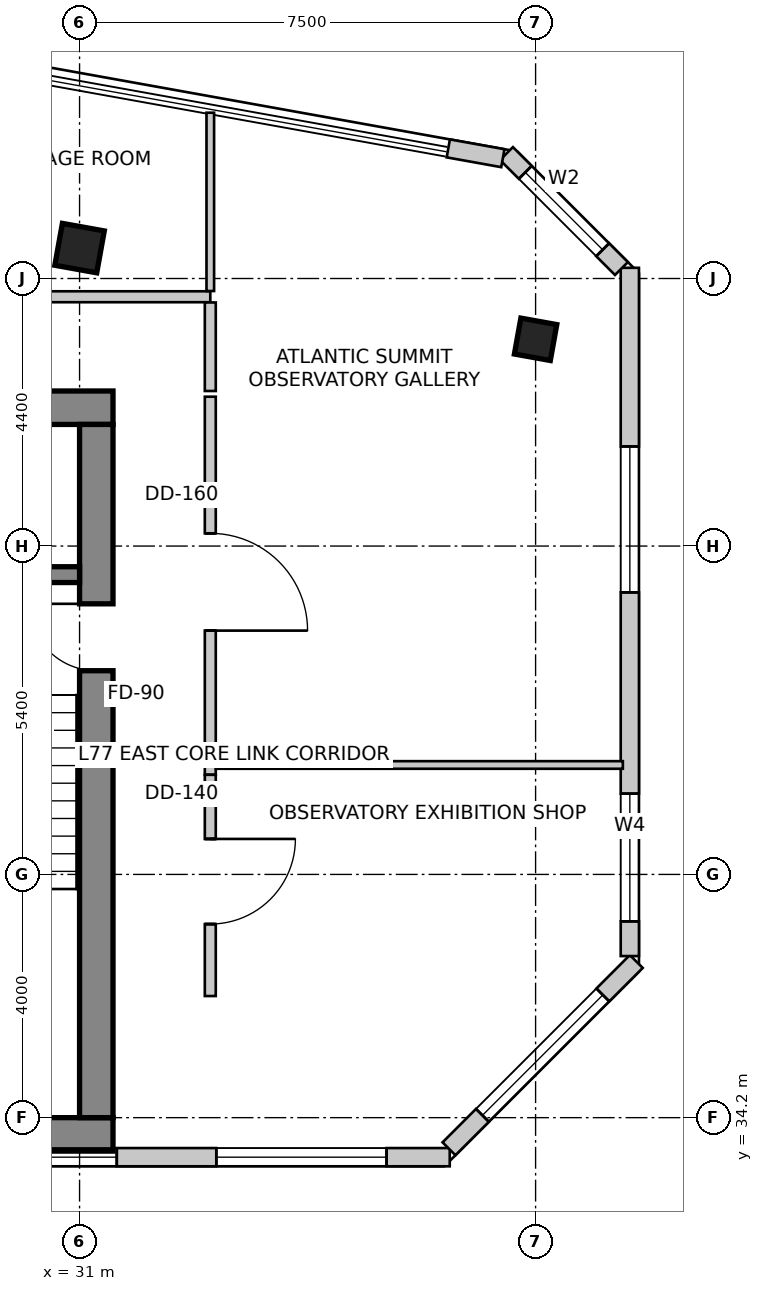
"""IFC4 building model, lengths in metres.
Left out: names, types, materials, properties, quantities, classifications, styles, units other than length and angle.
Written with IfcOpenShell. Run it as: python <this file> out.ifc"""

import sys

from ifc_helpers import new_model, si_unit, direction, frame, frame_2d, origin, origin_2d, place, context, subcontext, project, spatial, rectangle, extrude, source, transform, mapped, element, fill, save


model = new_model("IFC4")
c1 = context("Model", 3, precision=1e-05, world=origin(), true_north=direction((0.0, 1.0)))
c2 = subcontext(c1, "Body", "Model", "MODEL_VIEW")
j1 = project(units=[si_unit("LENGTHUNIT", "METRE"), si_unit("PLANEANGLEUNIT", "RADIAN")], contexts=[c1])
p1 = place(None, origin())
s1 = spatial("IfcSite", under=j1, at=p1, CompositionType="ELEMENT")
p2 = place(p1, origin())
s2 = spatial("IfcBuilding", under=s1, at=p2, CompositionType="ELEMENT")
p3 = place(p2, frame((0.0, 0.0, 300.5)))
s3 = spatial("IfcBuildingStorey", under=s2, at=p3, CompositionType="ELEMENT", Elevation=300.5)
p4 = place(p3, frame((16.05, 45.875, 0.0), z_axis=(0.0, 0.0, 1.0), x_axis=(1.0, 0.0, 0.0)))
e1 = element("IfcWall", 1, at=p4, inside=s3, PredefinedType="SHEAR", context=c2, shape_type="SweptSolid", body=[
    extrude(rectangle(XDim=15.5, YDim=0.55, at=frame_2d((7.75, 0.0))), origin(), (0.0, 0.0, 1.0), 4.0),
])
p5 = place(p3, frame((16.05, 33.925, 0.0), z_axis=(0.0, 0.0, 1.0), x_axis=(1.0, 0.0, 0.0)))
e2 = element("IfcWall", 2, at=p5, inside=s3, PredefinedType="SHEAR", context=c2, shape_type="SweptSolid", body=[
    extrude(rectangle(XDim=15.5, YDim=0.55, at=frame_2d((7.75, 0.0))), origin(), (0.0, 0.0, 1.0), 4.0),
])
m1 = source(origin(), c2, "Body", "SweptSolid", [
    extrude(rectangle(XDim=1.1, YDim=2.15, at=frame_2d((0.55, 1.075))), frame((0.0, 0.285, 0.0), z_axis=(0.0, -1.0, 0.0), x_axis=(1.0, 0.0, 0.0)), (0.0, 0.0, 1.0), 0.57),
])
p6 = place(p5, frame((9.98, 0.0, 0.0)))
e3 = element("IfcOpeningElement", 3, at=p6, cuts=e2, PredefinedType="OPENING", context=c2, shape_type="MappedRepresentation", body=[
    mapped(m1, transform((0.0, 0.0, 0.0), scale=1.0)),
])
p7 = place(p3, frame((31.275, 34.2, 0.0), z_axis=(0.0, 0.0, 1.0), x_axis=(0.0, 1.0, 0.0)))
e4 = element("IfcWall", 4, at=p7, inside=s3, PredefinedType="SHEAR", context=c2, shape_type="SweptSolid", body=[
    extrude(rectangle(XDim=11.4, YDim=0.55, at=frame_2d((5.7, 0.0))), origin(), (0.0, 0.0, 1.0), 4.0),
])
p8 = place(p7, frame((7.35, 0.0, 0.0)))
e5 = element("IfcOpeningElement", 5, at=p8, cuts=e4, PredefinedType="OPENING", context=c2, shape_type="MappedRepresentation", body=[
    mapped(m1, transform((0.0, 0.0, 0.0), scale=1.0)),
])
p9 = place(p3, frame((27.5, 43.13, 0.0), z_axis=(0.0, 0.0, 1.0), x_axis=(1.0, 0.0, 0.0)))
e6 = element("IfcWall", 6, at=p9, inside=s3, PredefinedType="SHEAR", context=c2, shape_type="SweptSolid", body=[
    extrude(rectangle(XDim=3.5, YDim=0.26, at=frame_2d((1.75, 0.0))), origin(), (0.0, 0.0, 1.0), 4.0),
])
m2 = source(origin(), c2, "Body", "SweptSolid", [
    extrude(rectangle(XDim=0.7, YDim=0.7, at=origin_2d()), origin(), (0.0, 0.0, 1.0), 4.0),
])
p10 = place(p3, frame((31.0, 48.5, 0.0), z_axis=(0.0, 0.0, 1.0), x_axis=(0.984195607969, -0.17708474032, 0.0)))
e7 = element("IfcColumn", 7, at=p10, inside=s3, PredefinedType="COLUMN", context=c2, shape_type="MappedRepresentation", body=[
    mapped(m2, transform((0.0, 0.0, 0.0), scale=1.0)),
])
m3 = source(origin(), c2, "Body", "SweptSolid", [
    extrude(rectangle(XDim=0.6, YDim=0.6, at=origin_2d()), origin(), (0.0, 0.0, 1.0), 4.0),
])
p11 = place(p3, frame((38.5, 47.0, 0.0), z_axis=(0.0, 0.0, 1.0), x_axis=(0.984195607969, -0.17708474032, 0.0)))
e8 = element("IfcColumn", 8, at=p11, inside=s3, PredefinedType="COLUMN", context=c2, shape_type="MappedRepresentation", body=[
    mapped(m3, transform((0.0, 0.0, 0.0), scale=1.0)),
])
p12 = place(p3, frame((27.973, 33.55, 0.0), z_axis=(0.0, 0.0, 1.0), x_axis=(1.0, 0.0, 0.0)))
e9 = element("IfcWall", 9, at=p12, inside=s3, PredefinedType="SOLIDWALL", context=c2, shape_type="SweptSolid", body=[
    extrude(rectangle(XDim=9.115, YDim=0.3, at=frame_2d((4.558, 0.0))), origin(), (0.0, 0.0, 1.0), 3.7),
])
m4 = source(origin(), c2, "Body", "SweptSolid", [
    extrude(rectangle(XDim=2.4, YDim=2.2, at=frame_2d((1.2, 1.1))), frame((0.0, 0.16, 0.0), z_axis=(0.0, -1.0, 0.0), x_axis=(1.0, 0.0, 0.0)), (0.0, 0.0, 1.0), 0.32),
])
p13 = place(p12, frame((1.239, 0.0, 0.85)))
e10 = element("IfcOpeningElement", 10, at=p13, cuts=e9, PredefinedType="OPENING", context=c2, shape_type="MappedRepresentation", body=[
    mapped(m4, transform((0.0, 0.0, 0.0), scale=1.0)),
])
m5 = source(origin(), c2, "Body", "SweptSolid", [
    extrude(rectangle(XDim=2.8, YDim=2.4, at=frame_2d((1.4, 1.2))), frame((0.0, 0.16, 0.0), z_axis=(0.0, -1.0, 0.0), x_axis=(1.0, 0.0, 0.0)), (0.0, 0.0, 1.0), 0.32),
])
p14 = place(p12, frame((5.276, 0.0, 0.85)))
e11 = element("IfcOpeningElement", 11, at=p14, cuts=e9, PredefinedType="OPENING", context=c2, shape_type="MappedRepresentation", body=[
    mapped(m5, transform((0.0, 0.0, 0.0), scale=1.0)),
])
p15 = place(p3, frame((37.076, 33.688, 0.0), z_axis=(0.0, 0.0, 1.0), x_axis=(0.707078757535, 0.707134803727, 0.0)))
e12 = element("IfcWall", 12, at=p15, inside=s3, PredefinedType="SOLIDWALL", context=c2, shape_type="SweptSolid", body=[
    extrude(rectangle(XDim=4.356, YDim=0.3, at=frame_2d((2.178, 0.0))), origin(), (0.0, 0.0, 1.0), 3.7),
])
p16 = place(p15, frame((0.778, 0.0, 0.85)))
e13 = element("IfcOpeningElement", 13, at=p16, cuts=e12, PredefinedType="OPENING", context=c2, shape_type="MappedRepresentation", body=[
    mapped(m5, transform((0.0, 0.0, 0.0), scale=1.0)),
])
p17 = place(p3, frame((40.05, 36.857, 0.0), z_axis=(0.0, 0.0, 1.0), x_axis=(0.0, 1.0, 0.0)))
e14 = element("IfcWall", 14, at=p17, inside=s3, PredefinedType="SOLIDWALL", context=c2, shape_type="SweptSolid", body=[
    extrude(rectangle(XDim=11.318, YDim=0.3, at=frame_2d((5.659, 0.0))), origin(), (0.0, 0.0, 1.0), 3.7),
])
m6 = source(origin(), c2, "Body", "SweptSolid", [
    extrude(rectangle(XDim=2.1, YDim=2.0, at=frame_2d((1.05, 1.0))), frame((0.0, 0.16, 0.0), z_axis=(0.0, -1.0, 0.0), x_axis=(1.0, 0.0, 0.0)), (0.0, 0.0, 1.0), 0.32),
])
p18 = place(p17, frame((0.571, 0.0, 0.85)))
e15 = element("IfcOpeningElement", 15, at=p18, cuts=e14, PredefinedType="OPENING", context=c2, shape_type="MappedRepresentation", body=[
    mapped(m6, transform((0.0, 0.0, 0.0), scale=1.0)),
])
p19 = place(p17, frame((5.981, 0.0, 0.85)))
e16 = element("IfcOpeningElement", 16, at=p19, cuts=e14, PredefinedType="OPENING", context=c2, shape_type="MappedRepresentation", body=[
    mapped(m4, transform((0.0, 0.0, 0.0), scale=1.0)),
])
p20 = place(p3, frame((39.912, 48.164, 0.0), z_axis=(0.0, 0.0, 1.0), x_axis=(-0.70715242601, 0.707061133417, 0.0)))
e17 = element("IfcWall", 17, at=p20, inside=s3, PredefinedType="SOLIDWALL", context=c2, shape_type="SweptSolid", body=[
    extrude(rectangle(XDim=2.674, YDim=0.3, at=frame_2d((1.337, 0.0))), origin(), (0.0, 0.0, 1.0), 3.7),
])
m7 = source(origin(), c2, "Body", "SweptSolid", [
    extrude(rectangle(XDim=1.8, YDim=2.1, at=frame_2d((0.9, 1.05))), frame((0.0, 0.16, 0.0), z_axis=(0.0, -1.0, 0.0), x_axis=(1.0, 0.0, 0.0)), (0.0, 0.0, 1.0), 0.32),
])
p21 = place(p20, frame((0.437, 0.0, 0.85)))
e18 = element("IfcOpeningElement", 18, at=p21, cuts=e17, PredefinedType="OPENING", context=c2, shape_type="MappedRepresentation", body=[
    mapped(m7, transform((0.0, 0.0, 0.0), scale=1.0)),
])
p22 = place(p3, frame((37.962, 49.979, 0.0), z_axis=(0.0, 0.0, 1.0), x_axis=(-0.984215051171, 0.176976645491, 0.0)))
e19 = element("IfcWall", 19, at=p22, inside=s3, PredefinedType="SOLIDWALL", context=c2, shape_type="SweptSolid", body=[
    extrude(rectangle(XDim=0.912, YDim=0.3, at=frame_2d((0.456, 0.0))), origin(), (0.0, 0.0, 1.0), 3.7),
])
p23 = place(p3, frame((28.362, 47.7, 0.0), z_axis=(0.0, 0.0, 1.0), x_axis=(1.0, 0.0, 0.0)))
e20 = element("IfcWall", 20, at=p23, inside=s3, PredefinedType="PARTITIONING", context=c2, shape_type="SweptSolid", body=[
    extrude(rectangle(XDim=4.788, YDim=0.18, at=frame_2d((2.394, 0.0))), origin(), (0.0, 0.0, 1.0), 3.272),
])
m8 = source(origin(), c2, "Body", "SweptSolid", [
    extrude(rectangle(XDim=0.85, YDim=2.15, at=frame_2d((0.425, 1.075))), frame((0.0, 0.1, 0.0), z_axis=(0.0, -1.0, 0.0), x_axis=(1.0, 0.0, 0.0)), (0.0, 0.0, 1.0), 0.2),
])
p24 = place(p23, frame((0.401, 0.0, 0.0)))
e21 = element("IfcOpeningElement", 21, at=p24, cuts=e20, PredefinedType="OPENING", context=c2, shape_type="MappedRepresentation", body=[
    mapped(m8, transform((0.0, 0.0, 0.0), scale=1.0)),
])
p25 = place(p3, frame((33.15, 47.606, 0.0), z_axis=(0.0, 0.0, 1.0), x_axis=(0.0, -1.0, 0.0)))
e22 = element("IfcWall", 22, at=p25, inside=s3, PredefinedType="PARTITIONING", context=c2, shape_type="SweptSolid", body=[
    extrude(rectangle(XDim=1.456, YDim=0.18, at=frame_2d((0.728, 0.0))), origin(), (0.0, 0.0, 1.0), 3.7),
])
p26 = place(p3, frame((33.15, 46.056, 0.0), z_axis=(0.0, 0.0, 1.0), x_axis=(0.0, -1.0, 0.0)))
e23 = element("IfcWall", 23, at=p26, inside=s3, PredefinedType="PARTITIONING", context=c2, shape_type="SweptSolid", body=[
    extrude(rectangle(XDim=6.216, YDim=0.18, at=frame_2d((3.108, 0.0))), origin(), (0.0, 0.0, 1.0), 3.272),
])
m9 = source(origin(), c2, "Body", "SweptSolid", [
    extrude(rectangle(XDim=1.6, YDim=2.15, at=frame_2d((0.8, 1.075))), frame((0.0, 0.1, 0.0), z_axis=(0.0, -1.0, 0.0), x_axis=(1.0, 0.0, 0.0)), (0.0, 0.0, 1.0), 0.2),
])
p27 = place(p26, frame((2.247, 0.0, 0.0)))
e24 = element("IfcOpeningElement", 24, at=p27, cuts=e23, PredefinedType="OPENING", context=c2, shape_type="MappedRepresentation", body=[
    mapped(m9, transform((0.0, 0.0, 0.0), scale=1.0)),
])
p28 = place(p3, frame((33.15, 39.838, 0.0), z_axis=(0.0, 0.0, 1.0), x_axis=(0.0, -1.0, 0.0)))
e25 = element("IfcWall", 25, at=p28, inside=s3, PredefinedType="PARTITIONING", context=c2, shape_type="SweptSolid", body=[
    extrude(rectangle(XDim=3.638, YDim=0.18, at=frame_2d((1.819, 0.0))), origin(), (0.0, 0.0, 1.0), 3.7),
])
m10 = source(origin(), c2, "Body", "SweptSolid", [
    extrude(rectangle(XDim=1.4, YDim=2.15, at=frame_2d((0.7, 1.075))), frame((0.0, 0.1, 0.0), z_axis=(0.0, -1.0, 0.0), x_axis=(1.0, 0.0, 0.0)), (0.0, 0.0, 1.0), 0.2),
])
p29 = place(p28, frame((1.054, 0.0, 0.0)))
e26 = element("IfcOpeningElement", 26, at=p29, cuts=e25, PredefinedType="OPENING", context=c2, shape_type="MappedRepresentation", body=[
    mapped(m10, transform((0.0, 0.0, 0.0), scale=1.0)),
])
p30 = place(p3, frame((33.15, 50.727, 0.0), z_axis=(0.0, 0.0, 1.0), x_axis=(0.0, -1.0, 0.0)))
e27 = element("IfcWall", 27, at=p30, inside=s3, PredefinedType="PARTITIONING", context=c2, shape_type="SweptSolid", body=[
    extrude(rectangle(XDim=2.933, YDim=0.125, at=frame_2d((1.466, 0.0))), origin(), (0.0, 0.0, 1.0), 2.992),
])
p31 = place(p3, frame((39.935, 40.0, 0.0), z_axis=(0.0, 0.0, 1.0), x_axis=(-1.0, 0.0, 0.0)))
e28 = element("IfcWall", 28, at=p31, inside=s3, PredefinedType="PARTITIONING", context=c2, shape_type="SweptSolid", body=[
    extrude(rectangle(XDim=6.691, YDim=0.125, at=frame_2d((3.346, 0.0))), origin(), (0.0, 0.0, 1.0), 3.7),
])
m11 = source(origin(), c2, "Body", "SweptSolid", [
    extrude(rectangle(XDim=2.4, YDim=2.2, at=frame_2d((1.2, 1.1))), frame((0.0, -0.015, 0.0), z_axis=(0.0, -1.0, 0.0), x_axis=(1.0, 0.0, 0.0)), (0.0, 0.0, 1.0), 0.06),
])
p32 = place(p13, origin())
e29 = element("IfcWindow", 29, at=p32, inside=s3, PartitioningType="SINGLE_PANEL", PredefinedType="WINDOW", context=c2, shape_type="MappedRepresentation", body=[
    mapped(m11, transform((0.0, 0.0, 0.0), scale=1.0)),
])
fill(e10, e29)
m12 = source(origin(), c2, "Body", "SweptSolid", [
    extrude(rectangle(XDim=2.8, YDim=2.4, at=frame_2d((1.4, 1.2))), frame((0.0, -0.015, 0.0), z_axis=(0.0, -1.0, 0.0), x_axis=(1.0, 0.0, 0.0)), (0.0, 0.0, 1.0), 0.06),
])
p33 = place(p14, origin())
e30 = element("IfcWindow", 30, at=p33, inside=s3, PartitioningType="SINGLE_PANEL", PredefinedType="WINDOW", context=c2, shape_type="MappedRepresentation", body=[
    mapped(m12, transform((0.0, 0.0, 0.0), scale=1.0)),
])
fill(e11, e30)
p34 = place(p16, origin())
e31 = element("IfcWindow", 31, at=p34, inside=s3, PartitioningType="SINGLE_PANEL", PredefinedType="WINDOW", context=c2, shape_type="MappedRepresentation", body=[
    mapped(m12, transform((0.0, 0.0, 0.0), scale=1.0)),
])
fill(e13, e31)
m13 = source(origin(), c2, "Body", "SweptSolid", [
    extrude(rectangle(XDim=2.1, YDim=2.0, at=frame_2d((1.05, 1.0))), frame((0.0, -0.015, 0.0), z_axis=(0.0, -1.0, 0.0), x_axis=(1.0, 0.0, 0.0)), (0.0, 0.0, 1.0), 0.06),
])
p35 = place(p18, origin())
e32 = element("IfcWindow", 32, at=p35, inside=s3, PartitioningType="SINGLE_PANEL", PredefinedType="WINDOW", context=c2, shape_type="MappedRepresentation", body=[
    mapped(m13, transform((0.0, 0.0, 0.0), scale=1.0)),
])
fill(e15, e32)
p36 = place(p19, origin())
e33 = element("IfcWindow", 33, at=p36, inside=s3, PartitioningType="SINGLE_PANEL", PredefinedType="WINDOW", context=c2, shape_type="MappedRepresentation", body=[
    mapped(m11, transform((0.0, 0.0, 0.0), scale=1.0)),
])
fill(e16, e33)
m14 = source(origin(), c2, "Body", "SweptSolid", [
    extrude(rectangle(XDim=1.8, YDim=2.1, at=frame_2d((0.9, 1.05))), frame((0.0, -0.015, 0.0), z_axis=(0.0, -1.0, 0.0), x_axis=(1.0, 0.0, 0.0)), (0.0, 0.0, 1.0), 0.06),
])
p37 = place(p21, origin())
e34 = element("IfcWindow", 34, at=p37, inside=s3, PartitioningType="SINGLE_PANEL", PredefinedType="WINDOW", context=c2, shape_type="MappedRepresentation", body=[
    mapped(m14, transform((0.0, 0.0, 0.0), scale=1.0)),
])
fill(e18, e34)
m15 = source(origin(), c2, "Body", "SweptSolid", [
    extrude(rectangle(XDim=1.1, YDim=2.15, at=frame_2d((0.55, 1.075))), frame((0.0, 0.025, 0.0), z_axis=(0.0, -1.0, 0.0), x_axis=(1.0, 0.0, 0.0)), (0.0, 0.0, 1.0), 0.05),
])
p38 = place(p8, origin())
e35 = element("IfcDoor", 35, at=p38, inside=s3, OperationType="SINGLE_SWING_RIGHT", PredefinedType="DOOR", context=c2, shape_type="MappedRepresentation", body=[
    mapped(m15, transform((0.0, 0.0, 0.0), scale=1.0)),
])
fill(e5, e35)
m16 = source(origin(), c2, "Body", "SweptSolid", [
    extrude(rectangle(XDim=1.6, YDim=2.15, at=frame_2d((0.8, 1.075))), frame((0.0, 0.025, 0.0), z_axis=(0.0, -1.0, 0.0), x_axis=(1.0, 0.0, 0.0)), (0.0, 0.0, 1.0), 0.05),
])
p39 = place(p27, origin())
e36 = element("IfcDoor", 36, at=p39, inside=s3, OperationType="SINGLE_SWING_RIGHT", PredefinedType="DOOR", context=c2, shape_type="MappedRepresentation", body=[
    mapped(m16, transform((0.0, 0.0, 0.0), scale=1.0)),
])
fill(e24, e36)
m17 = source(origin(), c2, "Body", "SweptSolid", [
    extrude(rectangle(XDim=1.4, YDim=2.15, at=frame_2d((0.7, 1.075))), frame((0.0, 0.025, 0.0), z_axis=(0.0, -1.0, 0.0), x_axis=(1.0, 0.0, 0.0)), (0.0, 0.0, 1.0), 0.05),
])
p40 = place(p29, origin())
e37 = element("IfcDoor", 37, at=p40, inside=s3, OperationType="SINGLE_SWING_LEFT", PredefinedType="DOOR", context=c2, shape_type="MappedRepresentation", body=[
    mapped(m17, transform((0.0, 0.0, 0.0), scale=1.0)),
])
fill(e26, e37)
save(model, sys.argv[1])
